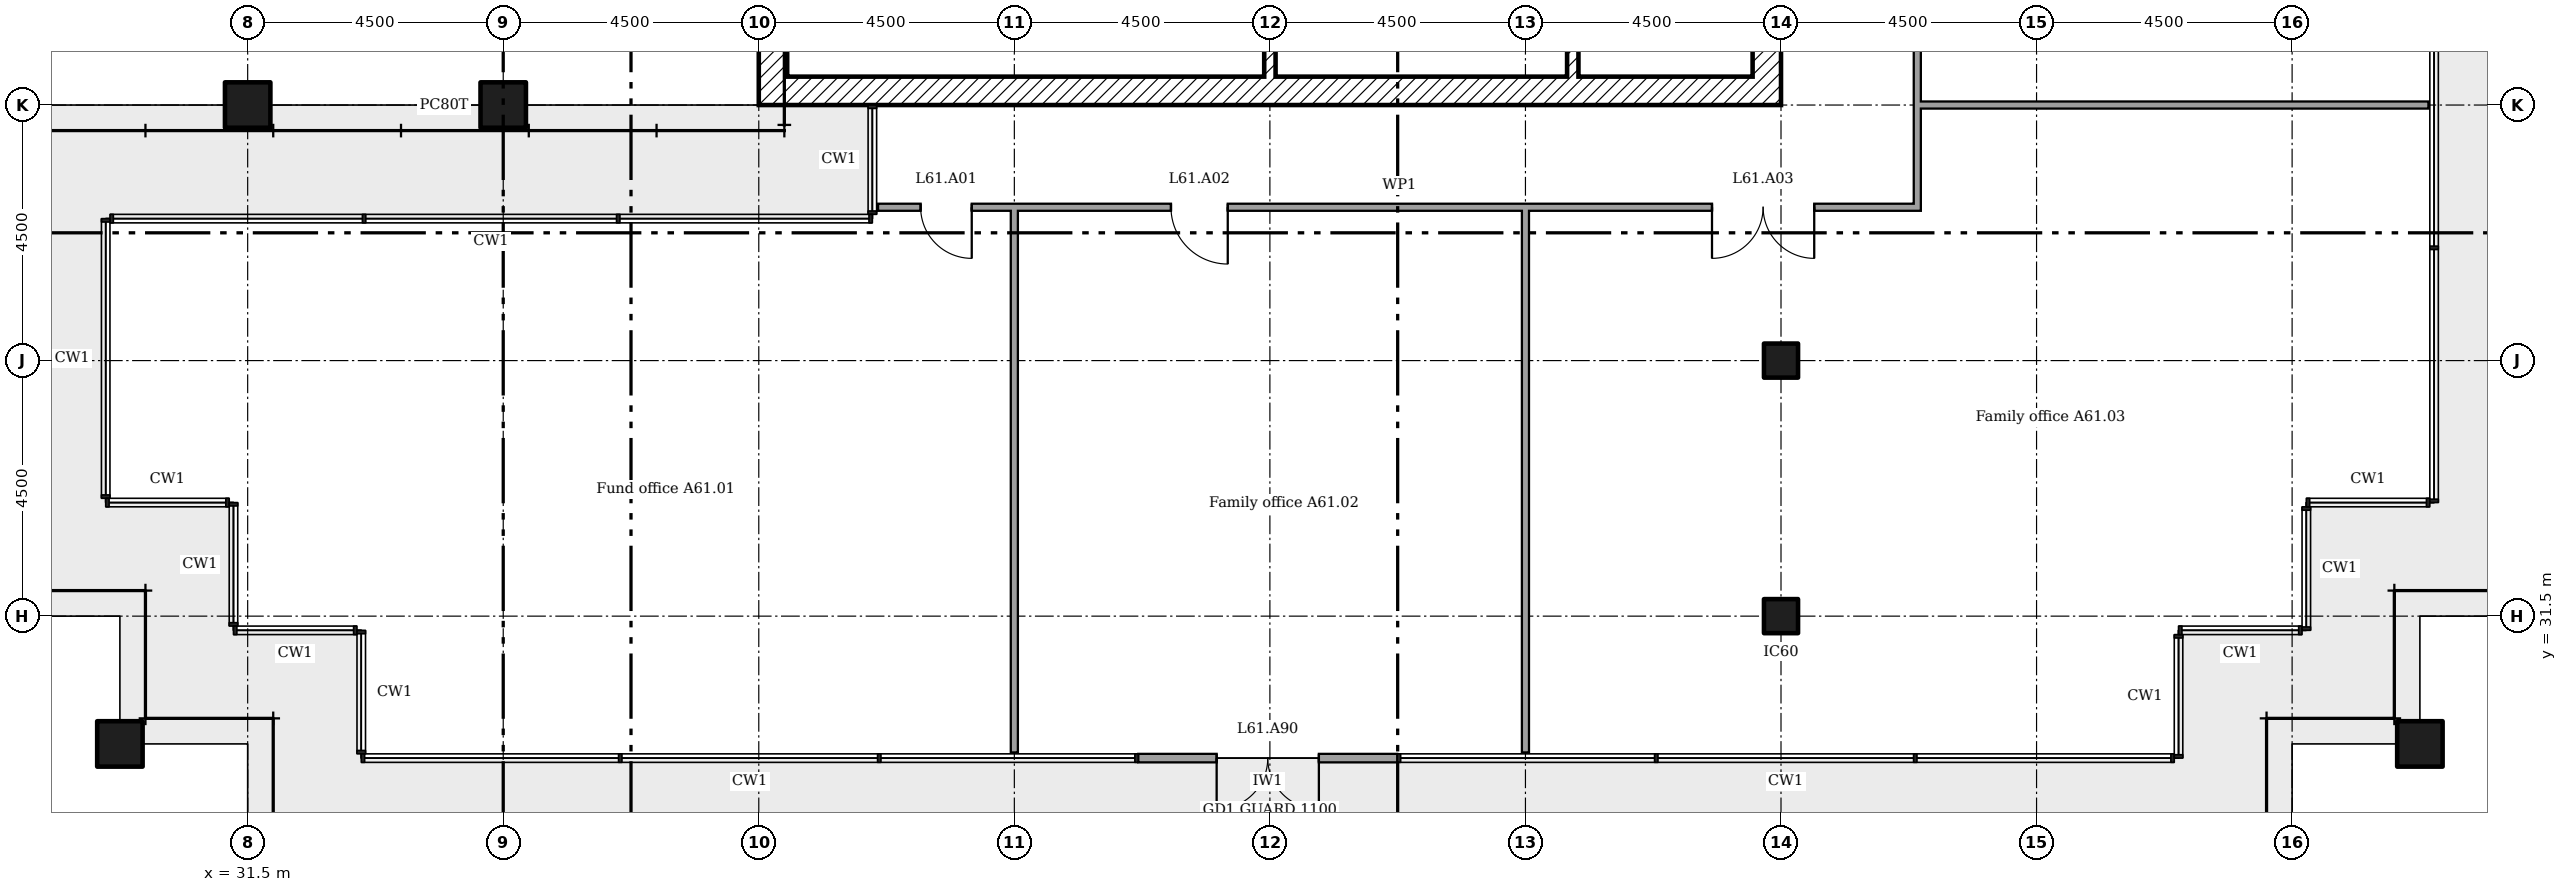
"""IFC4 building model, lengths in metres.
Left out: names, types, materials, properties, quantities, classifications, styles, units other than length and angle.
Written with IfcOpenShell. Run it as: python <this file> out.ifc"""

import sys

from ifc_helpers import new_model, si_unit, direction, frame, frame_2d, origin, origin_2d, place, context, subcontext, project, spatial, rectangle, extrude, element, fill, save


model = new_model("IFC4")
c1 = context("Model", 3, precision=1e-05, world=origin(), true_north=direction((0.0, 1.0)))
c2 = subcontext(c1, "Body", "Model", "MODEL_VIEW")
j1 = project(units=[si_unit("LENGTHUNIT", "METRE"), si_unit("PLANEANGLEUNIT", "RADIAN")], contexts=[c1])
p1 = place(None, origin())
s1 = spatial("IfcSite", under=j1, at=p1, CompositionType="ELEMENT")
p2 = place(p1, origin())
s2 = spatial("IfcBuilding", under=s1, at=p2, CompositionType="ELEMENT")
p3 = place(p2, frame((0.0, 0.0, 238.8)))
s3 = spatial("IfcBuildingStorey", under=s2, at=p3, CompositionType="ELEMENT", Elevation=238.8)
for number, where in (
    (1, (69.75, 29.25, 0.0)),
    (2, (36.0, 40.5, 0.0)),
    (3, (31.5, 40.5, 0.0)),
    (4, (29.25, 29.25, 0.0)),
):
    element("IfcColumn", number, at=place(p3, frame(where)), inside=s3, PredefinedType="COLUMN", context=c2, shape_type="SweptSolid", body=[
        extrude(rectangle(XDim=0.8, YDim=0.8, at=origin_2d()), origin(), (0.0, 0.0, 1.0), 3.6),
    ])
for number, where in (
    (5, (58.5, 31.5, 0.0)),
    (6, (58.5, 36.0, 0.0)),
):
    element("IfcColumn", number, at=place(p3, frame(where)), inside=s3, PredefinedType="COLUMN", context=c2, shape_type="SweptSolid", body=[
        extrude(rectangle(XDim=0.6, YDim=0.6, at=origin_2d()), origin(), (0.0, 0.0, 1.0), 3.6),
    ])
p4 = place(p3, frame((47.182, 29.0, 0.0)))
e7 = element("IfcWall", 7, at=p4, inside=s3, PredefinedType="SOLIDWALL", context=c2, shape_type="SweptSolid", body=[
    extrude(rectangle(XDim=4.561, YDim=0.15, at=frame_2d((2.28, 0.0))), origin(), (0.0, 0.0, 1.0), 3.45),
])
p5 = place(p4, frame((1.38, 0.0, 0.0)))
e8 = element("IfcOpeningElement", 8, at=p5, cuts=e7, PredefinedType="OPENING", context=c2, shape_type="SweptSolid", body=[
    extrude(rectangle(XDim=1.8, YDim=2.4, at=frame_2d((0.9, 1.2))), frame((0.0, 0.085, 0.0), z_axis=(0.0, -1.0, 0.0), x_axis=(1.0, 0.0, 0.0)), (0.0, 0.0, 1.0), 0.17),
])
p6 = place(p3, frame((58.25, 40.5, 0.0), z_axis=(0.0, 0.0, 1.0), x_axis=(0.0, 1.0, 0.0)))
e9 = element("IfcWall", 9, at=p6, inside=s3, PredefinedType="SHEAR", context=c2, shape_type="SweptSolid", body=[
    extrude(rectangle(XDim=18.0, YDim=0.5, at=frame_2d((9.0, 0.0))), origin(), (0.0, 0.0, 1.0), 3.35),
])
p7 = place(p6, frame((13.15, 0.0, 0.0)))
e10 = element("IfcOpeningElement", 10, at=p7, cuts=e9, PredefinedType="OPENING", context=c2, shape_type="SweptSolid", body=[
    extrude(rectangle(XDim=1.2, YDim=2.1, at=frame_2d((0.6, 1.05))), frame((0.0, 0.26, 0.0), z_axis=(0.0, -1.0, 0.0), x_axis=(1.0, 0.0, 0.0)), (0.0, 0.0, 1.0), 0.52),
])
p8 = place(p6, frame((3.9, 0.0, 0.0)))
e11 = element("IfcOpeningElement", 11, at=p8, cuts=e9, PredefinedType="OPENING", context=c2, shape_type="SweptSolid", body=[
    extrude(rectangle(XDim=1.8, YDim=2.1, at=frame_2d((0.9, 1.05))), frame((0.0, 0.26, 0.0), z_axis=(0.0, -1.0, 0.0), x_axis=(1.0, 0.0, 0.0)), (0.0, 0.0, 1.0), 0.52),
])
p9 = place(p6, frame((11.525, 0.0, 0.0)))
e12 = element("IfcOpeningElement", 12, at=p9, cuts=e9, PredefinedType="OPENING", context=c2, shape_type="SweptSolid", body=[
    extrude(rectangle(XDim=1.0, YDim=2.1, at=frame_2d((0.5, 1.05))), frame((0.0, 0.26, 0.0), z_axis=(0.0, -1.0, 0.0), x_axis=(1.0, 0.0, 0.0)), (0.0, 0.0, 1.0), 0.52),
])
p10 = place(p3, frame((40.5, 40.75, 0.0)))
e13 = element("IfcWall", 13, at=p10, inside=s3, PredefinedType="SHEAR", context=c2, shape_type="SweptSolid", body=[
    extrude(rectangle(XDim=17.5, YDim=0.5, at=frame_2d((8.75, 0.0))), origin(), (0.0, 0.0, 1.0), 3.35),
])
p11 = place(p3, frame((40.75, 41.0, 0.0), z_axis=(0.0, 0.0, 1.0), x_axis=(0.0, 1.0, 0.0)))
e14 = element("IfcWall", 14, at=p11, inside=s3, PredefinedType="SHEAR", context=c2, shape_type="SweptSolid", body=[
    extrude(rectangle(XDim=17.0, YDim=0.5, at=frame_2d((8.5, 0.0))), origin(), (0.0, 0.0, 1.0), 3.35),
])
for number, where, z_axis, x_axis in (
    (15, (49.5, 41.0, 0.0), (0.0, 0.0, 1.0), (0.0, 1.0, 0.0)),
    (16, (54.833, 41.0, 0.0), (0.0, 0.0, 1.0), (0.0, 1.0, 0.0)),
):
    element("IfcWall", number, at=place(p3, frame(where, z_axis=z_axis, x_axis=x_axis)), inside=s3, PredefinedType="SHEAR", context=c2, shape_type="SweptSolid", body=[
        extrude(rectangle(XDim=2.8, YDim=0.2, at=frame_2d((1.4, 0.0))), origin(), (0.0, 0.0, 1.0), 3.35),
    ])
p12 = place(p3, frame((42.6, 38.7, 0.0)))
e17 = element("IfcWall", 17, at=p12, inside=s3, PredefinedType="PARTITIONING", context=c2, shape_type="SweptSolid", body=[
    extrude(rectangle(XDim=18.362, YDim=0.125, at=frame_2d((9.181, 0.0))), origin(), (0.0, 0.0, 1.0), 3.45),
])
p13 = place(p12, frame((0.75, 0.0, 0.0)))
e18 = element("IfcOpeningElement", 18, at=p13, cuts=e17, PredefinedType="OPENING", context=c2, shape_type="SweptSolid", body=[
    extrude(rectangle(XDim=0.9, YDim=2.1, at=frame_2d((0.45, 1.05))), frame((0.0, 0.073, 0.0), z_axis=(0.0, -1.0, 0.0), x_axis=(1.0, 0.0, 0.0)), (0.0, 0.0, 1.0), 0.145),
])
p14 = place(p12, frame((5.158, 0.0, 0.0)))
e19 = element("IfcOpeningElement", 19, at=p14, cuts=e17, PredefinedType="OPENING", context=c2, shape_type="SweptSolid", body=[
    extrude(rectangle(XDim=1.0, YDim=2.1, at=frame_2d((0.5, 1.05))), frame((0.0, 0.073, 0.0), z_axis=(0.0, -1.0, 0.0), x_axis=(1.0, 0.0, 0.0)), (0.0, 0.0, 1.0), 0.145),
])
p15 = place(p12, frame((14.685, 0.0, 0.0)))
e20 = element("IfcOpeningElement", 20, at=p15, cuts=e17, PredefinedType="OPENING", context=c2, shape_type="SweptSolid", body=[
    extrude(rectangle(XDim=1.8, YDim=2.1, at=frame_2d((0.9, 1.05))), frame((0.0, 0.073, 0.0), z_axis=(0.0, -1.0, 0.0), x_axis=(1.0, 0.0, 0.0)), (0.0, 0.0, 1.0), 0.145),
])
p16 = place(p3, frame((60.9, 40.5, 0.0)))
e21 = element("IfcWall", 21, at=p16, inside=s3, PredefinedType="PARTITIONING", context=c2, shape_type="SweptSolid", body=[
    extrude(rectangle(XDim=9.0, YDim=0.125, at=frame_2d((4.5, 0.0))), origin(), (0.0, 0.0, 1.0), 2.772),
])
for number, where, z_axis, x_axis in (
    (22, (45.0, 29.1, 0.0), (0.0, 0.0, 1.0), (0.0, 1.0, 0.0)),
    (23, (54.0, 29.1, 0.0), (0.0, 0.0, 1.0), (0.0, 1.0, 0.0)),
):
    element("IfcWall", number, at=place(p3, frame(where, z_axis=z_axis, x_axis=x_axis)), inside=s3, PredefinedType="PARTITIONING", context=c2, shape_type="SweptSolid", body=[
        extrude(rectangle(XDim=9.6, YDim=0.125, at=frame_2d((4.8, 0.0))), origin(), (0.0, 0.0, 1.0), 2.772),
    ])
p17 = place(p3, frame((60.9, 38.762, 0.0), z_axis=(0.0, 0.0, 1.0), x_axis=(0.0, 1.0, 0.0)))
e24 = element("IfcWall", 24, at=p17, inside=s3, PredefinedType="PARTITIONING", context=c2, shape_type="SweptSolid", body=[
    extrude(rectangle(XDim=9.475, YDim=0.125, at=frame_2d((4.738, 0.0))), origin(), (0.0, 0.0, 1.0), 3.45),
])
p18 = place(p5, frame((1.8, 0.0, 0.0), x_axis=(-1.0, 0.0, 0.0)))
e25 = element("IfcDoor", 25, at=p18, inside=s3, OperationType="DOUBLE_DOOR_DOUBLE_SWING", PredefinedType="NOTDEFINED", context=c2, shape_type="SweptSolid", body=[
    extrude(rectangle(XDim=1.8, YDim=2.4, at=frame_2d((0.9, 1.2))), frame((0.0, 0.025, 0.0), z_axis=(0.0, -1.0, 0.0), x_axis=(1.0, 0.0, 0.0)), (0.0, 0.0, 1.0), 0.05),
])
fill(e8, e25)
p19 = place(p13, frame((0.9, 0.0, 0.0), x_axis=(-1.0, 0.0, 0.0)))
e26 = element("IfcDoor", 26, at=p19, inside=s3, OperationType="SINGLE_SWING_RIGHT", PredefinedType="DOOR", context=c2, shape_type="SweptSolid", body=[
    extrude(rectangle(XDim=0.9, YDim=2.1, at=frame_2d((0.45, 1.05))), frame((0.0, 0.025, 0.0), z_axis=(0.0, -1.0, 0.0), x_axis=(1.0, 0.0, 0.0)), (0.0, 0.0, 1.0), 0.05),
])
fill(e18, e26)
p20 = place(p14, frame((1.0, 0.0, 0.0), x_axis=(-1.0, 0.0, 0.0)))
e27 = element("IfcDoor", 27, at=p20, inside=s3, OperationType="SINGLE_SWING_RIGHT", PredefinedType="DOOR", context=c2, shape_type="SweptSolid", body=[
    extrude(rectangle(XDim=1.0, YDim=2.1, at=frame_2d((0.5, 1.05))), frame((0.0, 0.025, 0.0), z_axis=(0.0, -1.0, 0.0), x_axis=(1.0, 0.0, 0.0)), (0.0, 0.0, 1.0), 0.05),
])
fill(e19, e27)
p21 = place(p15, frame((1.8, 0.0, 0.0), x_axis=(-1.0, 0.0, 0.0)))
e28 = element("IfcDoor", 28, at=p21, inside=s3, OperationType="DOUBLE_DOOR_SINGLE_SWING", PredefinedType="DOOR", context=c2, shape_type="SweptSolid", body=[
    extrude(rectangle(XDim=1.8, YDim=2.1, at=frame_2d((0.9, 1.05))), frame((0.0, 0.025, 0.0), z_axis=(0.0, -1.0, 0.0), x_axis=(1.0, 0.0, 0.0)), (0.0, 0.0, 1.0), 0.05),
])
fill(e20, e28)
save(model, sys.argv[1])
